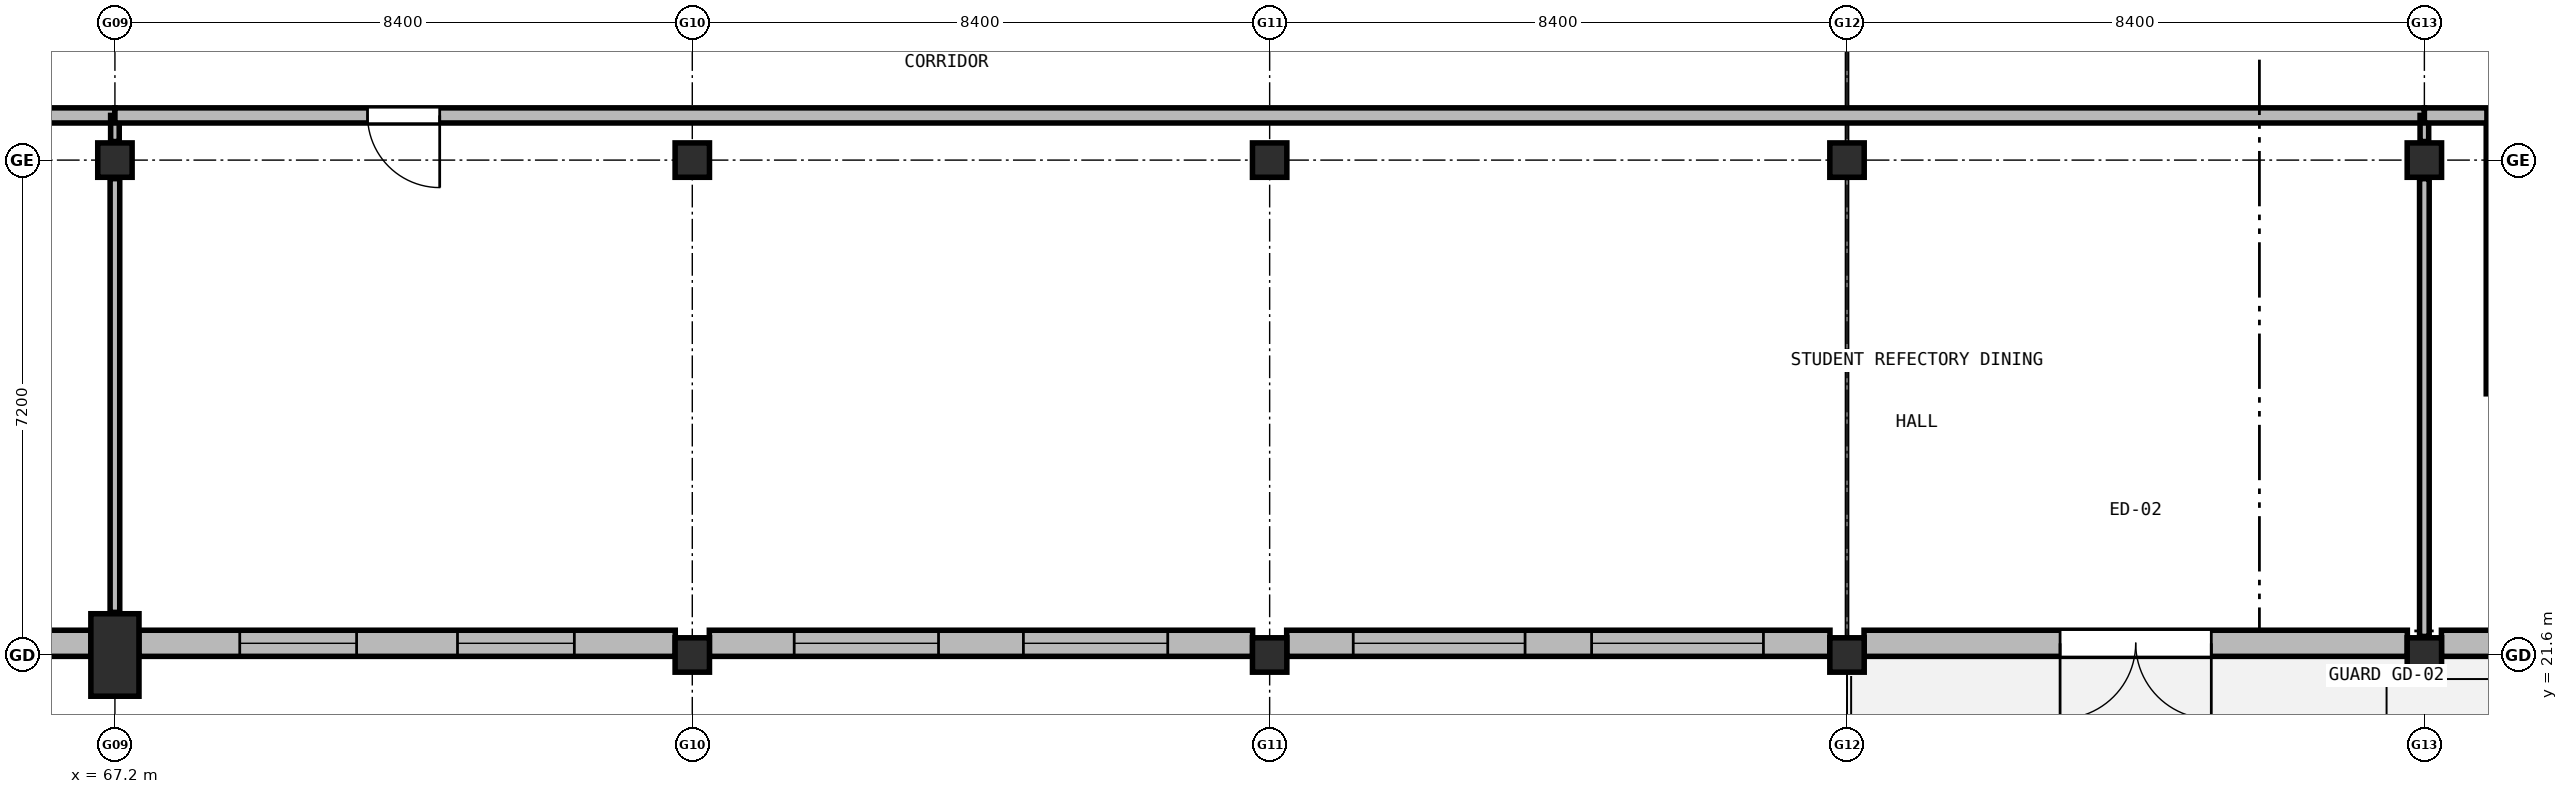
"""IFC4 building model, lengths in metres.
Left out: names, types, materials, properties, quantities, classifications, styles, units other than length and angle.
Written with IfcOpenShell. Run it as: python <this file> out.ifc"""

import sys

from ifc_helpers import new_model, si_unit, direction, frame, frame_2d, origin, origin_2d, place, context, subcontext, project, spatial, rectangle, extrude, element, fill, save


model = new_model("IFC4")
c1 = context("Model", 3, precision=1e-05, world=origin(), true_north=direction((0.0, 1.0)))
c2 = subcontext(c1, "Body", "Model", "MODEL_VIEW")
j1 = project(units=[si_unit("LENGTHUNIT", "METRE"), si_unit("PLANEANGLEUNIT", "RADIAN")], contexts=[c1])
p1 = place(None, origin())
s1 = spatial("IfcSite", under=j1, at=p1, CompositionType="ELEMENT")
p2 = place(p1, origin())
s2 = spatial("IfcBuilding", under=s1, at=p2, CompositionType="ELEMENT")
p3 = place(p2, origin())
s3 = spatial("IfcBuildingStorey", under=s2, at=p3, CompositionType="ELEMENT", Elevation=0.0)
p4 = place(p3, frame((67.2, 21.6, 0.0), z_axis=(0.0, 0.0, 1.0), x_axis=(1.0, 0.0, 0.0)))
e1 = element("IfcColumn", 1, at=p4, inside=s3, PredefinedType="COLUMN", context=c2, shape_type="SweptSolid", body=[
    extrude(rectangle(XDim=0.7, YDim=1.2, at=origin_2d()), origin(), (0.0, 0.0, 1.0), 5.1),
])
for number, where, z_axis, x_axis in (
    (2, (67.2, 28.8, 0.0), (0.0, 0.0, 1.0), (1.0, 0.0, 0.0)),
    (3, (75.6, 21.6, 0.0), (0.0, 0.0, 1.0), (1.0, 0.0, 0.0)),
    (4, (75.6, 28.8, 0.0), (0.0, 0.0, 1.0), (1.0, 0.0, 0.0)),
    (5, (84.0, 21.6, 0.0), (0.0, 0.0, 1.0), (1.0, 0.0, 0.0)),
    (6, (84.0, 28.8, 0.0), (0.0, 0.0, 1.0), (1.0, 0.0, 0.0)),
    (7, (92.4, 21.6, 0.0), (0.0, 0.0, 1.0), (1.0, 0.0, 0.0)),
    (8, (92.4, 28.8, 0.0), (0.0, 0.0, 1.0), (1.0, 0.0, 0.0)),
    (9, (100.8, 21.6, 0.0), (0.0, 0.0, 1.0), (1.0, 0.0, 0.0)),
    (10, (100.8, 28.8, 0.0), (0.0, 0.0, 1.0), (1.0, 0.0, 0.0)),
):
    element("IfcColumn", number, at=place(p3, frame(where, z_axis=z_axis, x_axis=x_axis)), inside=s3, PredefinedType="COLUMN", context=c2, shape_type="SweptSolid", body=[
        extrude(rectangle(XDim=0.5, YDim=0.5, at=origin_2d()), origin(), (0.0, 0.0, 1.0), 5.1),
    ])
p5 = place(p3, frame((108.952, 21.77, 0.0), z_axis=(0.0, 0.0, 1.0), x_axis=(-1.0, 0.0, 0.0)))
e11 = element("IfcWall", 11, at=p5, inside=s3, PredefinedType="SOLIDWALL", context=c2, shape_type="SweptSolid", body=[
    extrude(rectangle(XDim=7.904, YDim=0.38, at=frame_2d((3.952, 0.0))), origin(), (0.0, 0.0, 1.0), 4.498),
])
p6 = place(p5, frame((1.168, 0.0, 0.95)))
e12 = element("IfcOpeningElement", 12, at=p6, cuts=e11, PredefinedType="OPENING", context=c2, shape_type="SweptSolid", body=[
    extrude(rectangle(XDim=2.2, YDim=1.7, at=frame_2d((1.1, 0.85))), frame((0.0, 0.2, 0.0), z_axis=(0.0, -1.0, 0.0), x_axis=(1.0, 0.0, 0.0)), (0.0, 0.0, 1.0), 0.4),
])
p7 = place(p5, frame((4.536, 0.0, 0.95)))
e13 = element("IfcOpeningElement", 13, at=p7, cuts=e11, PredefinedType="OPENING", context=c2, shape_type="SweptSolid", body=[
    extrude(rectangle(XDim=2.2, YDim=1.7, at=frame_2d((1.1, 0.85))), frame((0.0, 0.2, 0.0), z_axis=(0.0, -1.0, 0.0), x_axis=(1.0, 0.0, 0.0)), (0.0, 0.0, 1.0), 0.4),
])
p8 = place(p3, frame((100.552, 21.77, 0.0), z_axis=(0.0, 0.0, 1.0), x_axis=(-1.0, 0.0, 0.0)))
e14 = element("IfcWall", 14, at=p8, inside=s3, PredefinedType="SOLIDWALL", context=c2, shape_type="SweptSolid", body=[
    extrude(rectangle(XDim=7.904, YDim=0.38, at=frame_2d((3.952, 0.0))), origin(), (0.0, 0.0, 1.0), 4.01),
])
p9 = place(p8, frame((2.852, 0.0, 0.0)))
e15 = element("IfcOpeningElement", 15, at=p9, cuts=e14, PredefinedType="OPENING", context=c2, shape_type="SweptSolid", body=[
    extrude(rectangle(XDim=2.2, YDim=2.4, at=frame_2d((1.1, 1.2))), frame((0.0, 0.2, 0.0), z_axis=(0.0, -1.0, 0.0), x_axis=(1.0, 0.0, 0.0)), (0.0, 0.0, 1.0), 0.4),
])
p10 = place(p3, frame((92.152, 21.77, 0.0), z_axis=(0.0, 0.0, 1.0), x_axis=(-1.0, 0.0, 0.0)))
e16 = element("IfcWall", 16, at=p10, inside=s3, PredefinedType="SOLIDWALL", context=c2, shape_type="SweptSolid", body=[
    extrude(rectangle(XDim=7.904, YDim=0.38, at=frame_2d((3.952, 0.0))), origin(), (0.0, 0.0, 1.0), 4.01),
])
p11 = place(p10, frame((0.968, 0.0, 0.95)))
e17 = element("IfcOpeningElement", 17, at=p11, cuts=e16, PredefinedType="OPENING", context=c2, shape_type="SweptSolid", body=[
    extrude(rectangle(XDim=2.5, YDim=2.05, at=frame_2d((1.25, 1.025))), frame((0.0, 0.2, 0.0), z_axis=(0.0, -1.0, 0.0), x_axis=(1.0, 0.0, 0.0)), (0.0, 0.0, 1.0), 0.4),
])
p12 = place(p10, frame((4.436, 0.0, 0.95)))
e18 = element("IfcOpeningElement", 18, at=p12, cuts=e16, PredefinedType="OPENING", context=c2, shape_type="SweptSolid", body=[
    extrude(rectangle(XDim=2.5, YDim=2.05, at=frame_2d((1.25, 1.025))), frame((0.0, 0.2, 0.0), z_axis=(0.0, -1.0, 0.0), x_axis=(1.0, 0.0, 0.0)), (0.0, 0.0, 1.0), 0.4),
])
p13 = place(p3, frame((83.752, 21.77, 0.0), z_axis=(0.0, 0.0, 1.0), x_axis=(-1.0, 0.0, 0.0)))
e19 = element("IfcWall", 19, at=p13, inside=s3, PredefinedType="SOLIDWALL", context=c2, shape_type="SweptSolid", body=[
    extrude(rectangle(XDim=7.904, YDim=0.38, at=frame_2d((3.952, 0.0))), origin(), (0.0, 0.0, 1.0), 4.01),
])
p14 = place(p13, frame((1.235, 0.0, 0.95)))
e20 = element("IfcOpeningElement", 20, at=p14, cuts=e19, PredefinedType="OPENING", context=c2, shape_type="SweptSolid", body=[
    extrude(rectangle(XDim=2.1, YDim=1.85, at=frame_2d((1.05, 0.925))), frame((0.0, 0.2, 0.0), z_axis=(0.0, -1.0, 0.0), x_axis=(1.0, 0.0, 0.0)), (0.0, 0.0, 1.0), 0.4),
])
p15 = place(p13, frame((4.569, 0.0, 0.95)))
e21 = element("IfcOpeningElement", 21, at=p15, cuts=e19, PredefinedType="OPENING", context=c2, shape_type="SweptSolid", body=[
    extrude(rectangle(XDim=2.1, YDim=1.85, at=frame_2d((1.05, 0.925))), frame((0.0, 0.2, 0.0), z_axis=(0.0, -1.0, 0.0), x_axis=(1.0, 0.0, 0.0)), (0.0, 0.0, 1.0), 0.4),
])
p16 = place(p3, frame((75.352, 21.77, 0.0), z_axis=(0.0, 0.0, 1.0), x_axis=(-1.0, 0.0, 0.0)))
e22 = element("IfcWall", 22, at=p16, inside=s3, PredefinedType="SOLIDWALL", context=c2, shape_type="SweptSolid", body=[
    extrude(rectangle(XDim=7.804, YDim=0.38, at=frame_2d((3.902, 0.0))), origin(), (0.0, 0.0, 1.0), 4.01),
])
p17 = place(p16, frame((1.468, 0.0, 0.95)))
e23 = element("IfcOpeningElement", 23, at=p17, cuts=e22, PredefinedType="OPENING", context=c2, shape_type="SweptSolid", body=[
    extrude(rectangle(XDim=1.7, YDim=1.65, at=frame_2d((0.85, 0.825))), frame((0.0, 0.2, 0.0), z_axis=(0.0, -1.0, 0.0), x_axis=(1.0, 0.0, 0.0)), (0.0, 0.0, 1.0), 0.4),
])
p18 = place(p16, frame((4.636, 0.0, 0.95)))
e24 = element("IfcOpeningElement", 24, at=p18, cuts=e22, PredefinedType="OPENING", context=c2, shape_type="SweptSolid", body=[
    extrude(rectangle(XDim=1.7, YDim=1.65, at=frame_2d((0.85, 0.825))), frame((0.0, 0.2, 0.0), z_axis=(0.0, -1.0, 0.0), x_axis=(1.0, 0.0, 0.0)), (0.0, 0.0, 1.0), 0.4),
])
p19 = place(p3, frame((66.852, 21.77, 0.0), z_axis=(0.0, 0.0, 1.0), x_axis=(-1.0, 0.0, 0.0)))
e25 = element("IfcWall", 25, at=p19, inside=s3, PredefinedType="SOLIDWALL", context=c2, shape_type="SweptSolid", body=[
    extrude(rectangle(XDim=16.104, YDim=0.38, at=frame_2d((8.052, 0.0))), origin(), (0.0, 0.0, 1.0), 3.31),
])
p20 = place(p19, frame((3.568, 0.0, 0.95)))
e26 = element("IfcOpeningElement", 26, at=p20, cuts=e25, PredefinedType="OPENING", context=c2, shape_type="SweptSolid", body=[
    extrude(rectangle(XDim=2.7, YDim=1.9, at=frame_2d((1.35, 0.95))), frame((0.0, 0.2, 0.0), z_axis=(0.0, -1.0, 0.0), x_axis=(1.0, 0.0, 0.0)), (0.0, 0.0, 1.0), 0.4),
])
p21 = place(p19, frame((9.836, 0.0, 0.95)))
e27 = element("IfcOpeningElement", 27, at=p21, cuts=e25, PredefinedType="OPENING", context=c2, shape_type="SweptSolid", body=[
    extrude(rectangle(XDim=2.7, YDim=1.9, at=frame_2d((1.35, 0.95))), frame((0.0, 0.2, 0.0), z_axis=(0.0, -1.0, 0.0), x_axis=(1.0, 0.0, 0.0)), (0.0, 0.0, 1.0), 0.4),
])
p22 = place(p3, frame((101.85, 25.4, 0.0), z_axis=(0.0, 0.0, 1.0), x_axis=(0.0, 1.0, 0.0)))
e28 = element("IfcWall", 28, at=p22, inside=s3, PredefinedType="SHEAR", context=c2, shape_type="SweptSolid", body=[
    extrude(rectangle(XDim=4.1, YDim=0.3, at=frame_2d((2.05, 0.0))), origin(), (0.0, 0.0, 1.0), 4.82),
])
p23 = place(p3, frame((67.2, 29.45, 0.0), z_axis=(0.0, 0.0, 1.0), x_axis=(-1.0, 0.0, 0.0)))
e29 = element("IfcWall", 29, at=p23, inside=s3, PredefinedType="SOLIDWALL", context=c2, shape_type="SweptSolid", body=[
    extrude(rectangle(XDim=33.6, YDim=0.22, at=frame_2d((16.8, 0.0))), origin(), (0.0, 0.0, 1.0), 4.105),
])
p24 = place(p23, frame((28.75, 0.0, 0.0)))
e30 = element("IfcOpeningElement", 30, at=p24, cuts=e29, PredefinedType="OPENING", context=c2, shape_type="SweptSolid", body=[
    extrude(rectangle(XDim=1.3, YDim=2.15, at=frame_2d((0.65, 1.075))), frame((0.0, 0.12, 0.0), z_axis=(0.0, -1.0, 0.0), x_axis=(1.0, 0.0, 0.0)), (0.0, 0.0, 1.0), 0.24),
])
p25 = place(p3, frame((67.2, 22.22, 0.0), z_axis=(0.0, 0.0, 1.0), x_axis=(0.0, 1.0, 0.0)))
e31 = element("IfcWall", 31, at=p25, inside=s3, PredefinedType="PARTITIONING", context=c2, shape_type="SweptSolid", body=[
    extrude(rectangle(XDim=6.31, YDim=0.14, at=frame_2d((3.155, 0.0))), origin(), (0.0, 0.0, 1.0), 4.005),
])
p26 = place(p3, frame((67.2, 29.07, 0.0), z_axis=(0.0, 0.0, 1.0), x_axis=(0.0, 1.0, 0.0)))
e32 = element("IfcWall", 32, at=p26, inside=s3, PredefinedType="PARTITIONING", context=c2, shape_type="SweptSolid", body=[
    extrude(rectangle(XDim=0.38, YDim=0.125, at=frame_2d((0.19, 0.0))), origin(), (0.0, 0.0, 1.0), 4.005),
])
p27 = place(p3, frame((100.8, 29.45, 0.0), z_axis=(0.0, 0.0, 1.0), x_axis=(-1.0, 0.0, 0.0)))
e33 = element("IfcWall", 33, at=p27, inside=s3, PredefinedType="SOLIDWALL", context=c2, shape_type="SweptSolid", body=[
    extrude(rectangle(XDim=33.6, YDim=0.22, at=frame_2d((16.8, 0.0))), origin(), (0.0, 0.0, 1.0), 4.105),
])
p28 = place(p27, frame((28.875, 0.0, 0.0)))
e34 = element("IfcOpeningElement", 34, at=p28, cuts=e33, PredefinedType="OPENING", context=c2, shape_type="SweptSolid", body=[
    extrude(rectangle(XDim=1.05, YDim=2.15, at=frame_2d((0.525, 1.075))), frame((0.0, 0.12, 0.0), z_axis=(0.0, -1.0, 0.0), x_axis=(1.0, 0.0, 0.0)), (0.0, 0.0, 1.0), 0.24),
])
p29 = place(p3, frame((100.8, 21.87, 0.0), z_axis=(0.0, 0.0, 1.0), x_axis=(0.0, 1.0, 0.0)))
e35 = element("IfcWall", 35, at=p29, inside=s3, PredefinedType="PARTITIONING", context=c2, shape_type="SweptSolid", body=[
    extrude(rectangle(XDim=6.66, YDim=0.14, at=frame_2d((3.33, 0.0))), origin(), (0.0, 0.0, 1.0), 4.005),
])
p30 = place(p3, frame((100.8, 29.07, 0.0), z_axis=(0.0, 0.0, 1.0), x_axis=(0.0, 1.0, 0.0)))
e36 = element("IfcWall", 36, at=p30, inside=s3, PredefinedType="PARTITIONING", context=c2, shape_type="SweptSolid", body=[
    extrude(rectangle(XDim=0.38, YDim=0.125, at=frame_2d((0.19, 0.0))), origin(), (0.0, 0.0, 1.0), 4.005),
])
p31 = place(p3, frame((101.71, 29.45, 0.0), z_axis=(0.0, 0.0, 1.0), x_axis=(-1.0, 0.0, 0.0)))
e37 = element("IfcWall", 37, at=p31, inside=s3, PredefinedType="SOLIDWALL", context=c2, shape_type="SweptSolid", body=[
    extrude(rectangle(XDim=0.91, YDim=0.22, at=frame_2d((0.455, 0.0))), origin(), (0.0, 0.0, 1.0), 4.105),
])
p32 = place(p9, origin())
e38 = element("IfcDoor", 38, at=p32, inside=s3, OperationType="DOUBLE_DOOR_SINGLE_SWING", PredefinedType="DOOR", context=c2, shape_type="SweptSolid", body=[
    extrude(rectangle(XDim=2.2, YDim=2.4, at=frame_2d((1.1, 1.2))), frame((0.0, 0.025, 0.0), z_axis=(0.0, -1.0, 0.0), x_axis=(1.0, 0.0, 0.0)), (0.0, 0.0, 1.0), 0.05),
])
fill(e15, e38)
p33 = place(p11, origin())
e39 = element("IfcWindow", 39, at=p33, inside=s3, PartitioningType="SINGLE_PANEL", PredefinedType="WINDOW", context=c2, shape_type="SweptSolid", body=[
    extrude(rectangle(XDim=2.5, YDim=2.05, at=frame_2d((1.25, 1.025))), frame((0.0, 0.03, 0.0), z_axis=(0.0, -1.0, 0.0), x_axis=(1.0, 0.0, 0.0)), (0.0, 0.0, 1.0), 0.06),
])
fill(e17, e39)
p34 = place(p12, origin())
e40 = element("IfcWindow", 40, at=p34, inside=s3, PartitioningType="SINGLE_PANEL", PredefinedType="WINDOW", context=c2, shape_type="SweptSolid", body=[
    extrude(rectangle(XDim=2.5, YDim=2.05, at=frame_2d((1.25, 1.025))), frame((0.0, 0.03, 0.0), z_axis=(0.0, -1.0, 0.0), x_axis=(1.0, 0.0, 0.0)), (0.0, 0.0, 1.0), 0.06),
])
fill(e18, e40)
p35 = place(p14, origin())
e41 = element("IfcWindow", 41, at=p35, inside=s3, PartitioningType="SINGLE_PANEL", PredefinedType="WINDOW", context=c2, shape_type="SweptSolid", body=[
    extrude(rectangle(XDim=2.1, YDim=1.85, at=frame_2d((1.05, 0.925))), frame((0.0, 0.03, 0.0), z_axis=(0.0, -1.0, 0.0), x_axis=(1.0, 0.0, 0.0)), (0.0, 0.0, 1.0), 0.06),
])
fill(e20, e41)
p36 = place(p15, origin())
e42 = element("IfcWindow", 42, at=p36, inside=s3, PartitioningType="SINGLE_PANEL", PredefinedType="WINDOW", context=c2, shape_type="SweptSolid", body=[
    extrude(rectangle(XDim=2.1, YDim=1.85, at=frame_2d((1.05, 0.925))), frame((0.0, 0.03, 0.0), z_axis=(0.0, -1.0, 0.0), x_axis=(1.0, 0.0, 0.0)), (0.0, 0.0, 1.0), 0.06),
])
fill(e21, e42)
p37 = place(p17, origin())
e43 = element("IfcWindow", 43, at=p37, inside=s3, PartitioningType="SINGLE_PANEL", PredefinedType="WINDOW", context=c2, shape_type="SweptSolid", body=[
    extrude(rectangle(XDim=1.7, YDim=1.65, at=frame_2d((0.85, 0.825))), frame((0.0, 0.03, 0.0), z_axis=(0.0, -1.0, 0.0), x_axis=(1.0, 0.0, 0.0)), (0.0, 0.0, 1.0), 0.06),
])
fill(e23, e43)
p38 = place(p18, origin())
e44 = element("IfcWindow", 44, at=p38, inside=s3, PartitioningType="SINGLE_PANEL", PredefinedType="WINDOW", context=c2, shape_type="SweptSolid", body=[
    extrude(rectangle(XDim=1.7, YDim=1.65, at=frame_2d((0.85, 0.825))), frame((0.0, 0.03, 0.0), z_axis=(0.0, -1.0, 0.0), x_axis=(1.0, 0.0, 0.0)), (0.0, 0.0, 1.0), 0.06),
])
fill(e24, e44)
p39 = place(p28, origin())
e45 = element("IfcDoor", 45, at=p39, inside=s3, OperationType="SINGLE_SWING_LEFT", PredefinedType="DOOR", context=c2, shape_type="SweptSolid", body=[
    extrude(rectangle(XDim=1.05, YDim=2.15, at=frame_2d((0.525, 1.075))), frame((0.0, 0.025, 0.0), z_axis=(0.0, -1.0, 0.0), x_axis=(1.0, 0.0, 0.0)), (0.0, 0.0, 1.0), 0.05),
])
fill(e34, e45)
save(model, sys.argv[1])
